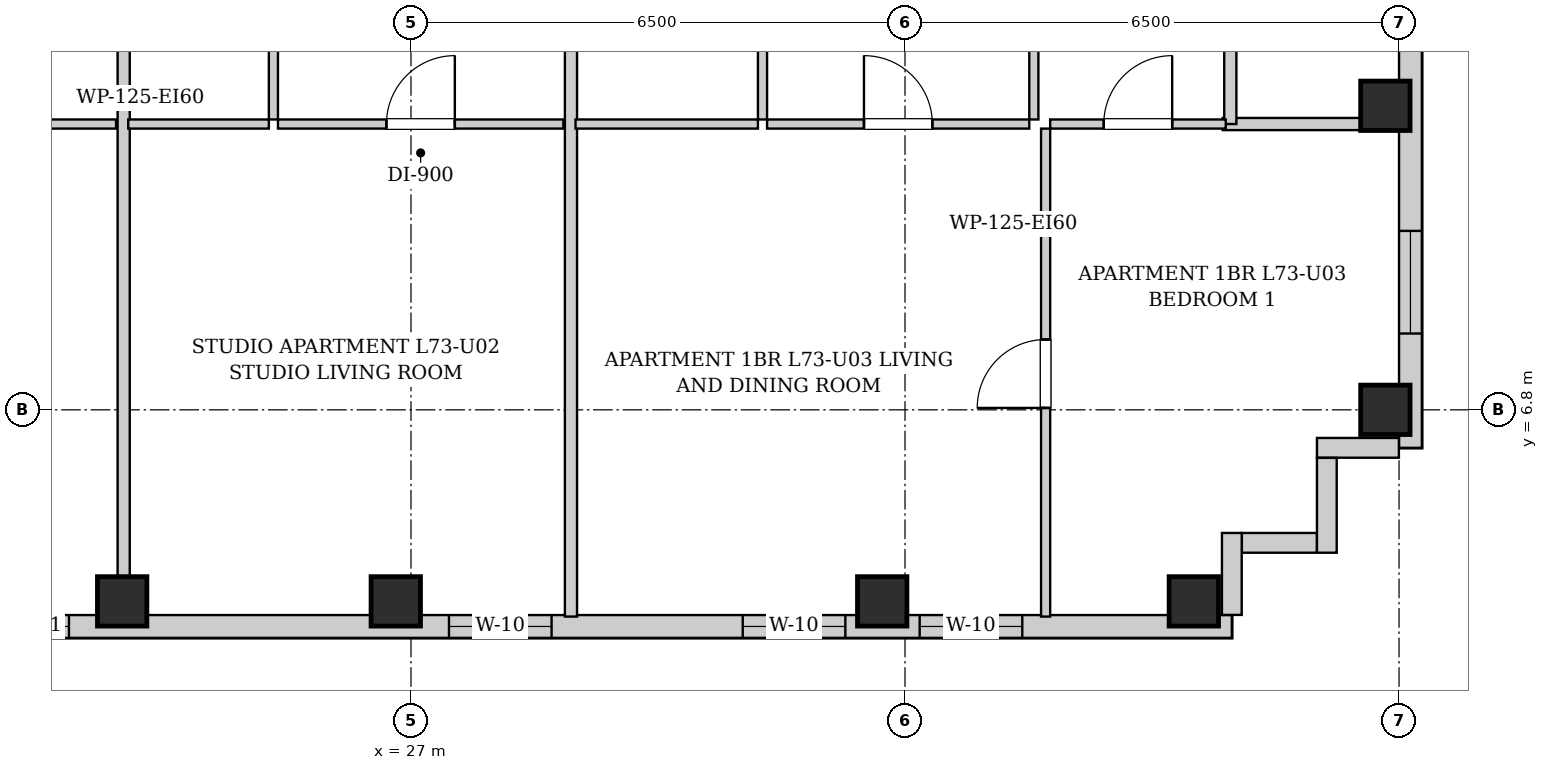
"""IFC4 building model, lengths in metres.
Left out: names, types, materials, properties, quantities, classifications, styles, units other than length and angle.
Written with IfcOpenShell. Run it as: python <this file> out.ifc"""

import sys

from ifc_helpers import new_model, si_unit, direction, frame, frame_2d, origin, origin_2d, place, context, subcontext, project, spatial, rectangle, extrude, element, fill, save


model = new_model("IFC4")
c1 = context("Model", 3, precision=1e-05, world=origin(), true_north=direction((0.0, 1.0)))
c2 = subcontext(c1, "Body", "Model", "MODEL_VIEW")
j1 = project(units=[si_unit("LENGTHUNIT", "METRE"), si_unit("PLANEANGLEUNIT", "RADIAN")], contexts=[c1])
p1 = place(None, origin())
s1 = spatial("IfcSite", under=j1, at=p1, CompositionType="ELEMENT")
p2 = place(p1, origin())
s2 = spatial("IfcBuilding", under=s1, at=p2, CompositionType="ELEMENT")
p3 = place(p2, frame((0.0, 0.0, 251.3)))
s3 = spatial("IfcBuildingStorey", under=s2, at=p3, CompositionType="ELEMENT", Elevation=251.3)
for number, where, z_axis, x_axis in (
    (1, (23.2, 4.28, 0.0), (0.0, 0.0, 1.0), (1.0, 0.0, 0.0)),
    (2, (26.8, 4.28, 0.0), (0.0, 0.0, 1.0), (1.0, 0.0, 0.0)),
    (3, (33.2, 4.28, 0.0), (0.0, 0.0, 1.0), (1.0, 0.0, 0.0)),
    (4, (37.3, 4.28, 0.0), (0.0, 0.0, 1.0), (1.0, 0.0, 0.0)),
    (5, (39.82, 6.8, 0.0), (0.0, 0.0, 1.0), (1.0, 0.0, 0.0)),
    (6, (39.82, 10.8, 0.0), (0.0, 0.0, 1.0), (1.0, 0.0, 0.0)),
):
    element("IfcColumn", number, at=place(p3, frame(where, z_axis=z_axis, x_axis=x_axis)), inside=s3, PredefinedType="COLUMN", context=c2, shape_type="SweptSolid", body=[
        extrude(rectangle(XDim=0.65, YDim=0.65, at=origin_2d()), origin(), (0.0, 0.0, 1.0), 3.4),
    ])
p4 = place(p3, frame((40.15, 37.7, 0.0), z_axis=(0.0, 0.0, 1.0), x_axis=(0.0, -1.0, 0.0)))
e7 = element("IfcWall", 7, at=p4, inside=s3, PredefinedType="SOLIDWALL", context=c2, shape_type="SweptSolid", body=[
    extrude(rectangle(XDim=31.4, YDim=0.3, at=frame_2d((15.7, 0.0))), origin(), (0.0, 0.0, 1.0), 3.14),
])
p5 = place(p4, frame((28.546, 0.0, 0.55)))
e8 = element("IfcOpeningElement", 8, at=p5, cuts=e7, PredefinedType="OPENING", context=c2, shape_type="SweptSolid", body=[
    extrude(rectangle(XDim=1.35, YDim=1.2, at=frame_2d((0.675, 0.6))), frame((0.0, 0.16, 0.0), z_axis=(0.0, -1.0, 0.0), x_axis=(1.0, 0.0, 0.0)), (0.0, 0.0, 1.0), 0.32),
])
p6 = place(p4, frame((1.504, 0.0, 0.55)))
e9 = element("IfcOpeningElement", 9, at=p6, cuts=e7, PredefinedType="OPENING", context=c2, shape_type="SweptSolid", body=[
    extrude(rectangle(XDim=1.35, YDim=1.2, at=frame_2d((0.675, 0.6))), frame((0.0, 0.16, 0.0), z_axis=(0.0, -1.0, 0.0), x_axis=(1.0, 0.0, 0.0)), (0.0, 0.0, 1.0), 0.32),
])
p7 = place(p4, frame((19.683, 0.0, 0.55)))
e10 = element("IfcOpeningElement", 10, at=p7, cuts=e7, PredefinedType="OPENING", context=c2, shape_type="SweptSolid", body=[
    extrude(rectangle(XDim=1.35, YDim=1.2, at=frame_2d((0.675, 0.6))), frame((0.0, 0.16, 0.0), z_axis=(0.0, -1.0, 0.0), x_axis=(1.0, 0.0, 0.0)), (0.0, 0.0, 1.0), 0.32),
])
p8 = place(p4, frame((10.367, 0.0, 0.55)))
e11 = element("IfcOpeningElement", 11, at=p8, cuts=e7, PredefinedType="OPENING", context=c2, shape_type="SweptSolid", body=[
    extrude(rectangle(XDim=1.35, YDim=1.2, at=frame_2d((0.675, 0.6))), frame((0.0, 0.16, 0.0), z_axis=(0.0, -1.0, 0.0), x_axis=(1.0, 0.0, 0.0)), (0.0, 0.0, 1.0), 0.32),
])
p9 = place(p3, frame((37.8, 3.95, 0.0), z_axis=(0.0, 0.0, 1.0), x_axis=(-1.0, 0.0, 0.0)))
e12 = element("IfcWall", 12, at=p9, inside=s3, PredefinedType="SOLIDWALL", context=c2, shape_type="SweptSolid", body=[
    extrude(rectangle(XDim=16.85, YDim=0.3, at=frame_2d((8.425, 0.0))), origin(), (0.0, 0.0, 1.0), 3.14),
])
p10 = place(p9, frame((15.3, 0.0, 0.55)))
e13 = element("IfcOpeningElement", 13, at=p10, cuts=e12, PredefinedType="OPENING", context=c2, shape_type="SweptSolid", body=[
    extrude(rectangle(XDim=0.85, YDim=1.2, at=frame_2d((0.425, 0.6))), frame((0.0, 0.16, 0.0), z_axis=(0.0, -1.0, 0.0), x_axis=(1.0, 0.0, 0.0)), (0.0, 0.0, 1.0), 0.32),
])
p11 = place(p9, frame((8.95, 0.0, 0.55)))
e14 = element("IfcOpeningElement", 14, at=p11, cuts=e12, PredefinedType="OPENING", context=c2, shape_type="SweptSolid", body=[
    extrude(rectangle(XDim=1.35, YDim=1.2, at=frame_2d((0.675, 0.6))), frame((0.0, 0.16, 0.0), z_axis=(0.0, -1.0, 0.0), x_axis=(1.0, 0.0, 0.0)), (0.0, 0.0, 1.0), 0.32),
])
p12 = place(p9, frame((5.085, 0.0, 0.55)))
e15 = element("IfcOpeningElement", 15, at=p12, cuts=e12, PredefinedType="OPENING", context=c2, shape_type="SweptSolid", body=[
    extrude(rectangle(XDim=1.35, YDim=1.2, at=frame_2d((0.675, 0.6))), frame((0.0, 0.16, 0.0), z_axis=(0.0, -1.0, 0.0), x_axis=(1.0, 0.0, 0.0)), (0.0, 0.0, 1.0), 0.32),
])
p13 = place(p9, frame((2.757, 0.0, 0.55)))
e16 = element("IfcOpeningElement", 16, at=p13, cuts=e12, PredefinedType="OPENING", context=c2, shape_type="SweptSolid", body=[
    extrude(rectangle(XDim=1.35, YDim=1.2, at=frame_2d((0.675, 0.6))), frame((0.0, 0.16, 0.0), z_axis=(0.0, -1.0, 0.0), x_axis=(1.0, 0.0, 0.0)), (0.0, 0.0, 1.0), 0.32),
])
p14 = place(p3, frame((39.998, 6.3, 0.0), z_axis=(0.0, 0.0, 1.0), x_axis=(-1.0, 0.0, 0.0)))
e17 = element("IfcWall", 17, at=p14, inside=s3, PredefinedType="SOLIDWALL", context=c2, shape_type="SweptSolid", body=[
    extrude(rectangle(XDim=1.078, YDim=0.26, at=frame_2d((0.539, 0.0))), origin(), (0.0, 0.0, 1.0), 3.14),
])
p15 = place(p3, frame((39.05, 6.168, 0.0), z_axis=(0.0, 0.0, 1.0), x_axis=(0.0, -1.0, 0.0)))
e18 = element("IfcWall", 18, at=p15, inside=s3, PredefinedType="SOLIDWALL", context=c2, shape_type="SweptSolid", body=[
    extrude(rectangle(XDim=1.248, YDim=0.26, at=frame_2d((0.624, 0.0))), origin(), (0.0, 0.0, 1.0), 3.14),
])
p16 = place(p3, frame((38.918, 5.05, 0.0), z_axis=(0.0, 0.0, 1.0), x_axis=(-1.0, 0.0, 0.0)))
e19 = element("IfcWall", 19, at=p16, inside=s3, PredefinedType="SOLIDWALL", context=c2, shape_type="SweptSolid", body=[
    extrude(rectangle(XDim=0.986, YDim=0.26, at=frame_2d((0.493, 0.0))), origin(), (0.0, 0.0, 1.0), 3.14),
])
p17 = place(p3, frame((37.8, 5.18, 0.0), z_axis=(0.0, 0.0, 1.0), x_axis=(0.0, -1.0, 0.0)))
e20 = element("IfcWall", 20, at=p17, inside=s3, PredefinedType="SOLIDWALL", context=c2, shape_type="SweptSolid", body=[
    extrude(rectangle(XDim=1.078, YDim=0.26, at=frame_2d((0.539, 0.0))), origin(), (0.0, 0.0, 1.0), 3.14),
])
p18 = place(p3, frame((20.37, 10.56, 0.0), z_axis=(0.0, 0.0, 1.0), x_axis=(1.0, 0.0, 0.0)))
e21 = element("IfcWall", 21, at=p18, inside=s3, PredefinedType="PARTITIONING", context=c2, shape_type="SweptSolid", body=[
    extrude(rectangle(XDim=2.75, YDim=0.12, at=frame_2d((1.375, 0.0))), origin(), (0.0, 0.0, 1.0), 3.14),
])
p19 = place(p18, frame((0.925, 0.0, 0.0)))
e22 = element("IfcOpeningElement", 22, at=p19, cuts=e21, PredefinedType="OPENING", context=c2, shape_type="SweptSolid", body=[
    extrude(rectangle(XDim=0.9, YDim=2.05, at=frame_2d((0.45, 1.025))), frame((0.0, 0.07, 0.0), z_axis=(0.0, -1.0, 0.0), x_axis=(1.0, 0.0, 0.0)), (0.0, 0.0, 1.0), 0.14),
])
p20 = place(p3, frame((23.22, 4.08, 0.0), z_axis=(0.0, 0.0, 1.0), x_axis=(0.0, 1.0, 0.0)))
e23 = element("IfcWall", 23, at=p20, inside=s3, PredefinedType="PARTITIONING", context=c2, shape_type="SweptSolid", body=[
    extrude(rectangle(XDim=9.39, YDim=0.16, at=frame_2d((4.695, 0.0))), origin(), (0.0, 0.0, 1.0), 3.14),
])
p21 = place(p3, frame((25.19, 10.62, 0.0), z_axis=(0.0, 0.0, 1.0), x_axis=(0.0, 1.0, 0.0)))
e24 = element("IfcWall", 24, at=p21, inside=s3, PredefinedType="PARTITIONING", context=c2, shape_type="SweptSolid", body=[
    extrude(rectangle(XDim=2.85, YDim=0.12, at=frame_2d((1.425, 0.0))), origin(), (0.0, 0.0, 1.0), 3.14),
])
p22 = place(p21, frame((0.995, 0.0, 0.0)))
e25 = element("IfcOpeningElement", 25, at=p22, cuts=e24, PredefinedType="OPENING", context=c2, shape_type="SweptSolid", body=[
    extrude(rectangle(XDim=0.86, YDim=2.05, at=frame_2d((0.43, 1.025))), frame((0.0, 0.07, 0.0), z_axis=(0.0, -1.0, 0.0), x_axis=(1.0, 0.0, 0.0)), (0.0, 0.0, 1.0), 0.14),
])
p23 = place(p3, frame((23.28, 10.56, 0.0), z_axis=(0.0, 0.0, 1.0), x_axis=(1.0, 0.0, 0.0)))
e26 = element("IfcWall", 26, at=p23, inside=s3, PredefinedType="PARTITIONING", context=c2, shape_type="SweptSolid", body=[
    extrude(rectangle(XDim=1.85, YDim=0.12, at=frame_2d((0.925, 0.0))), origin(), (0.0, 0.0, 1.0), 3.14),
])
p24 = place(p3, frame((25.25, 10.56, 0.0), z_axis=(0.0, 0.0, 1.0), x_axis=(1.0, 0.0, 0.0)))
e27 = element("IfcWall", 27, at=p24, inside=s3, PredefinedType="PARTITIONING", context=c2, shape_type="SweptSolid", body=[
    extrude(rectangle(XDim=3.755, YDim=0.12, at=frame_2d((1.877, 0.0))), origin(), (0.0, 0.0, 1.0), 3.14),
])
p25 = place(p24, frame((1.427, 0.0, 0.0)))
e28 = element("IfcOpeningElement", 28, at=p25, cuts=e27, PredefinedType="OPENING", context=c2, shape_type="SweptSolid", body=[
    extrude(rectangle(XDim=0.9, YDim=2.05, at=frame_2d((0.45, 1.025))), frame((0.0, 0.07, 0.0), z_axis=(0.0, -1.0, 0.0), x_axis=(1.0, 0.0, 0.0)), (0.0, 0.0, 1.0), 0.14),
])
p26 = place(p3, frame((37.68, 10.56, 0.0), z_axis=(0.0, 0.0, 1.0), x_axis=(1.0, 0.0, 0.0)))
e29 = element("IfcWall", 29, at=p26, inside=s3, PredefinedType="PARTITIONING", context=c2, shape_type="SweptSolid", body=[
    extrude(rectangle(XDim=2.34, YDim=0.16, at=frame_2d((1.17, 0.0))), origin(), (0.0, 0.0, 1.0), 3.14),
])
p27 = place(p3, frame((37.78, 10.56, 0.0), z_axis=(0.0, 0.0, 1.0), x_axis=(0.0, 1.0, 0.0)))
e30 = element("IfcWall", 30, at=p27, inside=s3, PredefinedType="PARTITIONING", context=c2, shape_type="SweptSolid", body=[
    extrude(rectangle(XDim=2.91, YDim=0.16, at=frame_2d((1.455, 0.0))), origin(), (0.0, 0.0, 1.0), 3.14),
])
p28 = place(p3, frame((29.105, 4.08, 0.0), z_axis=(0.0, 0.0, 1.0), x_axis=(0.0, 1.0, 0.0)))
e31 = element("IfcWall", 31, at=p28, inside=s3, PredefinedType="PARTITIONING", context=c2, shape_type="SweptSolid", body=[
    extrude(rectangle(XDim=9.39, YDim=0.16, at=frame_2d((4.695, 0.0))), origin(), (0.0, 0.0, 1.0), 3.14),
])
p29 = place(p3, frame((31.625, 10.62, 0.0), z_axis=(0.0, 0.0, 1.0), x_axis=(0.0, 1.0, 0.0)))
e32 = element("IfcWall", 32, at=p29, inside=s3, PredefinedType="PARTITIONING", context=c2, shape_type="SweptSolid", body=[
    extrude(rectangle(XDim=2.85, YDim=0.12, at=frame_2d((1.425, 0.0))), origin(), (0.0, 0.0, 1.0), 3.14),
])
p30 = place(p29, frame((0.995, 0.0, 0.0)))
e33 = element("IfcOpeningElement", 33, at=p30, cuts=e32, PredefinedType="OPENING", context=c2, shape_type="SweptSolid", body=[
    extrude(rectangle(XDim=0.86, YDim=2.05, at=frame_2d((0.43, 1.025))), frame((0.0, 0.07, 0.0), z_axis=(0.0, -1.0, 0.0), x_axis=(1.0, 0.0, 0.0)), (0.0, 0.0, 1.0), 0.14),
])
p31 = place(p3, frame((29.165, 10.56, 0.0), z_axis=(0.0, 0.0, 1.0), x_axis=(1.0, 0.0, 0.0)))
e34 = element("IfcWall", 34, at=p31, inside=s3, PredefinedType="PARTITIONING", context=c2, shape_type="SweptSolid", body=[
    extrude(rectangle(XDim=2.4, YDim=0.12, at=frame_2d((1.2, 0.0))), origin(), (0.0, 0.0, 1.0), 3.14),
])
p32 = place(p3, frame((35.195, 10.62, 0.0), z_axis=(0.0, 0.0, 1.0), x_axis=(0.0, 1.0, 0.0)))
e35 = element("IfcWall", 35, at=p32, inside=s3, PredefinedType="PARTITIONING", context=c2, shape_type="SweptSolid", body=[
    extrude(rectangle(XDim=2.85, YDim=0.12, at=frame_2d((1.425, 0.0))), origin(), (0.0, 0.0, 1.0), 3.14),
])
p33 = place(p32, frame((0.975, 0.0, 0.0)))
e36 = element("IfcOpeningElement", 36, at=p33, cuts=e35, PredefinedType="OPENING", context=c2, shape_type="SweptSolid", body=[
    extrude(rectangle(XDim=0.9, YDim=2.05, at=frame_2d((0.45, 1.025))), frame((0.0, 0.07, 0.0), z_axis=(0.0, -1.0, 0.0), x_axis=(1.0, 0.0, 0.0)), (0.0, 0.0, 1.0), 0.14),
])
p34 = place(p3, frame((31.685, 10.56, 0.0), z_axis=(0.0, 0.0, 1.0), x_axis=(1.0, 0.0, 0.0)))
e37 = element("IfcWall", 37, at=p34, inside=s3, PredefinedType="PARTITIONING", context=c2, shape_type="SweptSolid", body=[
    extrude(rectangle(XDim=3.45, YDim=0.12, at=frame_2d((1.725, 0.0))), origin(), (0.0, 0.0, 1.0), 3.14),
])
p35 = place(p34, frame((1.275, 0.0, 0.0)))
e38 = element("IfcOpeningElement", 38, at=p35, cuts=e37, PredefinedType="OPENING", context=c2, shape_type="SweptSolid", body=[
    extrude(rectangle(XDim=0.9, YDim=2.05, at=frame_2d((0.45, 1.025))), frame((0.0, 0.07, 0.0), z_axis=(0.0, -1.0, 0.0), x_axis=(1.0, 0.0, 0.0)), (0.0, 0.0, 1.0), 0.14),
])
p36 = place(p3, frame((35.41, 10.56, 0.0), z_axis=(0.0, 0.0, 1.0), x_axis=(1.0, 0.0, 0.0)))
e39 = element("IfcWall", 39, at=p36, inside=s3, PredefinedType="PARTITIONING", context=c2, shape_type="SweptSolid", body=[
    extrude(rectangle(XDim=2.31, YDim=0.12, at=frame_2d((1.155, 0.0))), origin(), (0.0, 0.0, 1.0), 3.14),
])
p37 = place(p36, frame((0.705, 0.0, 0.0)))
e40 = element("IfcOpeningElement", 40, at=p37, cuts=e39, PredefinedType="OPENING", context=c2, shape_type="SweptSolid", body=[
    extrude(rectangle(XDim=0.9, YDim=2.05, at=frame_2d((0.45, 1.025))), frame((0.0, 0.07, 0.0), z_axis=(0.0, -1.0, 0.0), x_axis=(1.0, 0.0, 0.0)), (0.0, 0.0, 1.0), 0.14),
])
p38 = place(p3, frame((35.35, 4.08, 0.0), z_axis=(0.0, 0.0, 1.0), x_axis=(0.0, 1.0, 0.0)))
e41 = element("IfcWall", 41, at=p38, inside=s3, PredefinedType="PARTITIONING", context=c2, shape_type="SweptSolid", body=[
    extrude(rectangle(XDim=6.42, YDim=0.12, at=frame_2d((3.21, 0.0))), origin(), (0.0, 0.0, 1.0), 3.14),
])
p39 = place(p38, frame((2.745, 0.0, 0.0)))
e42 = element("IfcOpeningElement", 42, at=p39, cuts=e41, PredefinedType="OPENING", context=c2, shape_type="SweptSolid", body=[
    extrude(rectangle(XDim=0.9, YDim=2.05, at=frame_2d((0.45, 1.025))), frame((0.0, 0.07, 0.0), z_axis=(0.0, -1.0, 0.0), x_axis=(1.0, 0.0, 0.0)), (0.0, 0.0, 1.0), 0.14),
])
p40 = place(p25, origin())
e43 = element("IfcDoor", 43, at=p40, inside=s3, OperationType="SINGLE_SWING_RIGHT", PredefinedType="DOOR", context=c2, shape_type="SweptSolid", body=[
    extrude(rectangle(XDim=0.9, YDim=2.05, at=frame_2d((0.45, 1.025))), frame((0.0, 0.025, 0.0), z_axis=(0.0, -1.0, 0.0), x_axis=(1.0, 0.0, 0.0)), (0.0, 0.0, 1.0), 0.05),
])
fill(e28, e43)
p41 = place(p35, origin())
e44 = element("IfcDoor", 44, at=p41, inside=s3, OperationType="SINGLE_SWING_LEFT", PredefinedType="DOOR", context=c2, shape_type="SweptSolid", body=[
    extrude(rectangle(XDim=0.9, YDim=2.05, at=frame_2d((0.45, 1.025))), frame((0.0, 0.025, 0.0), z_axis=(0.0, -1.0, 0.0), x_axis=(1.0, 0.0, 0.0)), (0.0, 0.0, 1.0), 0.05),
])
fill(e38, e44)
p42 = place(p37, origin())
e45 = element("IfcDoor", 45, at=p42, inside=s3, OperationType="SINGLE_SWING_RIGHT", PredefinedType="DOOR", context=c2, shape_type="SweptSolid", body=[
    extrude(rectangle(XDim=0.9, YDim=2.05, at=frame_2d((0.45, 1.025))), frame((0.0, 0.025, 0.0), z_axis=(0.0, -1.0, 0.0), x_axis=(1.0, 0.0, 0.0)), (0.0, 0.0, 1.0), 0.05),
])
fill(e40, e45)
p43 = place(p39, origin())
e46 = element("IfcDoor", 46, at=p43, inside=s3, OperationType="SINGLE_SWING_LEFT", PredefinedType="DOOR", context=c2, shape_type="SweptSolid", body=[
    extrude(rectangle(XDim=0.9, YDim=2.05, at=frame_2d((0.45, 1.025))), frame((0.0, 0.025, 0.0), z_axis=(0.0, -1.0, 0.0), x_axis=(1.0, 0.0, 0.0)), (0.0, 0.0, 1.0), 0.05),
])
fill(e42, e46)
p44 = place(p10, origin())
e47 = element("IfcWindow", 47, at=p44, inside=s3, PartitioningType="SINGLE_PANEL", PredefinedType="WINDOW", context=c2, shape_type="SweptSolid", body=[
    extrude(rectangle(XDim=0.85, YDim=1.2, at=frame_2d((0.425, 0.6))), frame((0.0, 0.03, 0.0), z_axis=(0.0, -1.0, 0.0), x_axis=(1.0, 0.0, 0.0)), (0.0, 0.0, 1.0), 0.06),
])
fill(e13, e47)
p45 = place(p11, origin())
e48 = element("IfcWindow", 48, at=p45, inside=s3, PartitioningType="SINGLE_PANEL", PredefinedType="WINDOW", context=c2, shape_type="SweptSolid", body=[
    extrude(rectangle(XDim=1.35, YDim=1.2, at=frame_2d((0.675, 0.6))), frame((0.0, 0.03, 0.0), z_axis=(0.0, -1.0, 0.0), x_axis=(1.0, 0.0, 0.0)), (0.0, 0.0, 1.0), 0.06),
])
fill(e14, e48)
p46 = place(p12, origin())
e49 = element("IfcWindow", 49, at=p46, inside=s3, PartitioningType="SINGLE_PANEL", PredefinedType="WINDOW", context=c2, shape_type="SweptSolid", body=[
    extrude(rectangle(XDim=1.35, YDim=1.2, at=frame_2d((0.675, 0.6))), frame((0.0, 0.03, 0.0), z_axis=(0.0, -1.0, 0.0), x_axis=(1.0, 0.0, 0.0)), (0.0, 0.0, 1.0), 0.06),
])
fill(e15, e49)
p47 = place(p13, origin())
e50 = element("IfcWindow", 50, at=p47, inside=s3, PartitioningType="SINGLE_PANEL", PredefinedType="WINDOW", context=c2, shape_type="SweptSolid", body=[
    extrude(rectangle(XDim=1.35, YDim=1.2, at=frame_2d((0.675, 0.6))), frame((0.0, 0.03, 0.0), z_axis=(0.0, -1.0, 0.0), x_axis=(1.0, 0.0, 0.0)), (0.0, 0.0, 1.0), 0.06),
])
fill(e16, e50)
p48 = place(p5, origin())
e51 = element("IfcWindow", 51, at=p48, inside=s3, PartitioningType="SINGLE_PANEL", PredefinedType="WINDOW", context=c2, shape_type="SweptSolid", body=[
    extrude(rectangle(XDim=1.35, YDim=1.2, at=frame_2d((0.675, 0.6))), frame((0.0, 0.03, 0.0), z_axis=(0.0, -1.0, 0.0), x_axis=(1.0, 0.0, 0.0)), (0.0, 0.0, 1.0), 0.06),
])
fill(e8, e51)
save(model, sys.argv[1])
